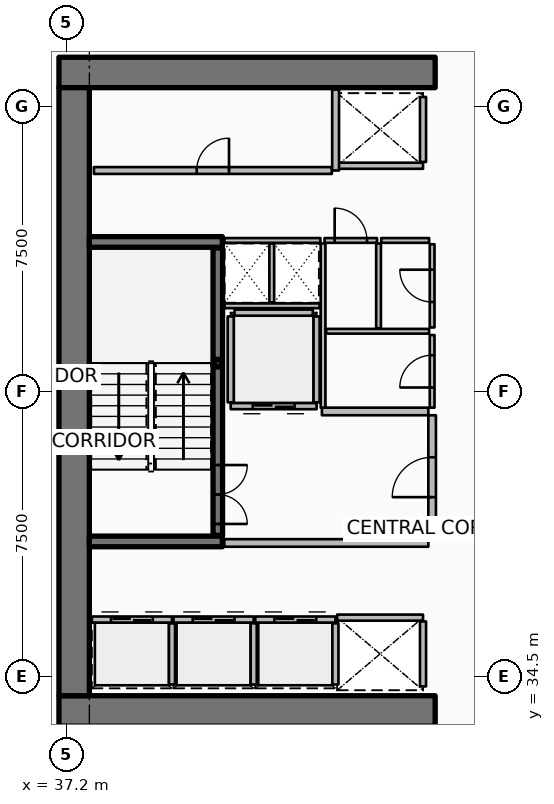
"""IFC4 building model, lengths in metres.
Left out: names, types, materials, properties, quantities, classifications, styles, units other than length and angle.
Written with IfcOpenShell. Run it as: python <this file> out.ifc"""

import sys

from ifc_helpers import new_model, si_unit, direction, frame, frame_2d, origin, origin_2d, place, context, subcontext, project, spatial, rectangle, hollow_rectangle, extrude, element, fill, save


model = new_model("IFC4")
c1 = context("Model", 3, precision=1e-05, world=origin(), true_north=direction((0.0, 1.0)))
c2 = subcontext(c1, "Body", "Model", "MODEL_VIEW")
j1 = project(units=[si_unit("LENGTHUNIT", "METRE"), si_unit("PLANEANGLEUNIT", "RADIAN")], contexts=[c1])
p1 = place(None, origin())
s1 = spatial("IfcSite", under=j1, at=p1, CompositionType="ELEMENT")
p2 = place(p1, origin())
s2 = spatial("IfcBuilding", under=s1, at=p2, CompositionType="ELEMENT")
p3 = place(p2, frame((0.0, 0.0, 97.65)))
s3 = spatial("IfcBuildingStorey", under=s2, at=p3, CompositionType="ELEMENT", Elevation=97.65)
for number, where, z_axis, x_axis in (
    (1, (37.0, 33.6, 0.0), (0.0, 0.0, 1.0), (1.0, 0.0, 0.0)),
    (2, (37.0, 50.4, 0.0), (0.0, 0.0, 1.0), (1.0, 0.0, 0.0)),
):
    element("IfcWall", number, at=place(p3, frame(where, z_axis=z_axis, x_axis=x_axis)), inside=s3, PredefinedType="SHEAR", context=c2, shape_type="SweptSolid", body=[
        extrude(rectangle(XDim=9.9, YDim=0.8, at=frame_2d((4.95, 0.0))), origin(), (0.0, 0.0, 1.0), 3.75),
    ])
p4 = place(p3, frame((37.4, 34.0, 0.0), z_axis=(0.0, 0.0, 1.0), x_axis=(0.0, 1.0, 0.0)))
e3 = element("IfcWall", 3, at=p4, inside=s3, PredefinedType="SHEAR", context=c2, shape_type="SweptSolid", body=[
    extrude(rectangle(XDim=16.0, YDim=0.8, at=frame_2d((8.0, 0.0))), origin(), (0.0, 0.0, 1.0), 3.75),
])
for number, where, z_axis, x_axis in (
    (4, (37.8, 38.06, 0.0), (0.0, 0.0, 1.0), (1.0, 0.0, 0.0)),
    (5, (37.8, 45.94, 0.0), (0.0, 0.0, 1.0), (1.0, 0.0, 0.0)),
):
    element("IfcWall", number, at=place(p3, frame(where, z_axis=z_axis, x_axis=x_axis)), inside=s3, PredefinedType="SHEAR", context=c2, shape_type="SweptSolid", body=[
        extrude(rectangle(XDim=3.5, YDim=0.28, at=frame_2d((1.75, 0.0))), origin(), (0.0, 0.0, 1.0), 3.75),
    ])
p5 = place(p3, frame((41.18, 42.75, 0.0), z_axis=(0.0, 0.0, 1.0), x_axis=(1.0, 0.0, 0.0)))
e6 = element("IfcColumn", 6, at=p5, inside=s3, PredefinedType="COLUMN", context=c2, shape_type="SweptSolid", body=[
    extrude(hollow_rectangle(XDim=0.2, YDim=0.2, WallThickness=0.01, InnerFilletRadius=0.01, OuterFilletRadius=0.02, at=origin_2d()), origin(), (0.0, 0.0, 1.0), 1.67),
])
p6 = place(p3, frame((41.18, 38.22, 0.0), z_axis=(0.0, 0.0, 1.0), x_axis=(0.0, 1.0, 0.0)))
e7 = element("IfcWall", 7, at=p6, inside=s3, PredefinedType="SOLIDWALL", context=c2, shape_type="SweptSolid", body=[
    extrude(rectangle(XDim=7.56, YDim=0.25, at=frame_2d((3.78, 0.0))), origin(), (0.0, 0.0, 1.0), 3.5),
])
p7 = place(p6, frame((0.3, 0.0, 0.0)))
e8 = element("IfcOpeningElement", 8, at=p7, cuts=e7, PredefinedType="OPENING", context=c2, shape_type="SweptSolid", body=[
    extrude(rectangle(XDim=1.55, YDim=2.15, at=frame_2d((0.775, 1.075))), frame((0.0, 0.135, 0.0), z_axis=(0.0, -1.0, 0.0), x_axis=(1.0, 0.0, 0.0)), (0.0, 0.0, 1.0), 0.27),
])
p8 = place(p3, frame((37.865, 36.005, 0.0), z_axis=(0.0, 0.0, 1.0), x_axis=(1.0, 0.0, 0.0)))
e9 = element("IfcWall", 9, at=p8, inside=s3, PredefinedType="PARTITIONING", context=c2, shape_type="SweptSolid", body=[
    extrude(rectangle(XDim=2.11, YDim=0.16, at=frame_2d((1.055, 0.0))), origin(), (0.0, 0.0, 1.0), 3.5),
])
p9 = place(p8, frame((0.505, 0.0, 0.0)))
e10 = element("IfcOpeningElement", 10, at=p9, cuts=e9, PredefinedType="OPENING", context=c2, shape_type="SweptSolid", body=[
    extrude(rectangle(XDim=1.1, YDim=2.1, at=frame_2d((0.55, 1.05))), frame((0.0, 0.09, 0.0), z_axis=(0.0, -1.0, 0.0), x_axis=(1.0, 0.0, 0.0)), (0.0, 0.0, 1.0), 0.18),
])
p10 = place(p3, frame((39.975, 34.295, 0.0), z_axis=(0.0, 0.0, 1.0), x_axis=(0.0, 1.0, 0.0)))
e11 = element("IfcWall", 11, at=p10, inside=s3, PredefinedType="PARTITIONING", context=c2, shape_type="SweptSolid", body=[
    extrude(rectangle(XDim=1.61, YDim=0.16, at=frame_2d((0.805, 0.0))), origin(), (0.0, 0.0, 1.0), 3.5),
])
p11 = place(p3, frame((40.015, 36.005, 0.0), z_axis=(0.0, 0.0, 1.0), x_axis=(1.0, 0.0, 0.0)))
e12 = element("IfcWall", 12, at=p11, inside=s3, PredefinedType="PARTITIONING", context=c2, shape_type="SweptSolid", body=[
    extrude(rectangle(XDim=2.11, YDim=0.16, at=frame_2d((1.055, 0.0))), origin(), (0.0, 0.0, 1.0), 3.5),
])
p12 = place(p11, frame((0.505, 0.0, 0.0)))
e13 = element("IfcOpeningElement", 13, at=p12, cuts=e12, PredefinedType="OPENING", context=c2, shape_type="SweptSolid", body=[
    extrude(rectangle(XDim=1.1, YDim=2.1, at=frame_2d((0.55, 1.05))), frame((0.0, 0.09, 0.0), z_axis=(0.0, -1.0, 0.0), x_axis=(1.0, 0.0, 0.0)), (0.0, 0.0, 1.0), 0.18),
])
p13 = place(p3, frame((42.125, 34.295, 0.0), z_axis=(0.0, 0.0, 1.0), x_axis=(0.0, 1.0, 0.0)))
e14 = element("IfcWall", 14, at=p13, inside=s3, PredefinedType="PARTITIONING", context=c2, shape_type="SweptSolid", body=[
    extrude(rectangle(XDim=1.61, YDim=0.16, at=frame_2d((0.805, 0.0))), origin(), (0.0, 0.0, 1.0), 3.5),
])
p14 = place(p3, frame((42.165, 36.005, 0.0), z_axis=(0.0, 0.0, 1.0), x_axis=(1.0, 0.0, 0.0)))
e15 = element("IfcWall", 15, at=p14, inside=s3, PredefinedType="PARTITIONING", context=c2, shape_type="SweptSolid", body=[
    extrude(rectangle(XDim=2.11, YDim=0.16, at=frame_2d((1.055, 0.0))), origin(), (0.0, 0.0, 1.0), 3.5),
])
p15 = place(p14, frame((0.505, 0.0, 0.0)))
e16 = element("IfcOpeningElement", 16, at=p15, cuts=e15, PredefinedType="OPENING", context=c2, shape_type="SweptSolid", body=[
    extrude(rectangle(XDim=1.1, YDim=2.1, at=frame_2d((0.55, 1.05))), frame((0.0, 0.09, 0.0), z_axis=(0.0, -1.0, 0.0), x_axis=(1.0, 0.0, 0.0)), (0.0, 0.0, 1.0), 0.18),
])
p16 = place(p3, frame((44.275, 34.295, 0.0), z_axis=(0.0, 0.0, 1.0), x_axis=(0.0, 1.0, 0.0)))
e17 = element("IfcWall", 17, at=p16, inside=s3, PredefinedType="PARTITIONING", context=c2, shape_type="SweptSolid", body=[
    extrude(rectangle(XDim=1.61, YDim=0.16, at=frame_2d((0.805, 0.0))), origin(), (0.0, 0.0, 1.0), 3.5),
])
p17 = place(p3, frame((46.58, 47.945, 0.0), z_axis=(0.0, 0.0, 1.0), x_axis=(-1.0, 0.0, 0.0)))
e18 = element("IfcWall", 18, at=p17, inside=s3, PredefinedType="PARTITIONING", context=c2, shape_type="SweptSolid", body=[
    extrude(rectangle(XDim=2.26, YDim=0.16, at=frame_2d((1.13, 0.0))), origin(), (0.0, 0.0, 1.0), 3.5),
])
p18 = place(p3, frame((46.58, 48.045, 0.0), z_axis=(0.0, 0.0, 1.0), x_axis=(0.0, 1.0, 0.0)))
e19 = element("IfcWall", 19, at=p18, inside=s3, PredefinedType="PARTITIONING", context=c2, shape_type="SweptSolid", body=[
    extrude(rectangle(XDim=1.71, YDim=0.16, at=frame_2d((0.855, 0.0))), origin(), (0.0, 0.0, 1.0), 3.5),
])
p19 = place(p3, frame((44.32, 36.055, 0.0), z_axis=(0.0, 0.0, 1.0), x_axis=(1.0, 0.0, 0.0)))
e20 = element("IfcWall", 20, at=p19, inside=s3, PredefinedType="PARTITIONING", context=c2, shape_type="SweptSolid", body=[
    extrude(rectangle(XDim=2.26, YDim=0.16, at=frame_2d((1.13, 0.0))), origin(), (0.0, 0.0, 1.0), 3.5),
])
p20 = place(p3, frame((46.58, 34.245, 0.0), z_axis=(0.0, 0.0, 1.0), x_axis=(0.0, 1.0, 0.0)))
e21 = element("IfcWall", 21, at=p20, inside=s3, PredefinedType="PARTITIONING", context=c2, shape_type="SweptSolid", body=[
    extrude(rectangle(XDim=1.71, YDim=0.16, at=frame_2d((0.855, 0.0))), origin(), (0.0, 0.0, 1.0), 3.5),
])
p21 = place(p3, frame((43.78, 41.62, 0.0), z_axis=(0.0, 0.0, 1.0), x_axis=(-1.0, 0.0, 0.0)))
e22 = element("IfcWall", 22, at=p21, inside=s3, PredefinedType="PARTITIONING", context=c2, shape_type="SweptSolid", body=[
    extrude(rectangle(XDim=2.26, YDim=0.16, at=frame_2d((1.13, 0.0))), origin(), (0.0, 0.0, 1.0), 3.5),
])
p22 = place(p21, frame((0.58, 0.0, 0.0)))
e23 = element("IfcOpeningElement", 23, at=p22, cuts=e22, PredefinedType="OPENING", context=c2, shape_type="SweptSolid", body=[
    extrude(rectangle(XDim=1.1, YDim=2.1, at=frame_2d((0.55, 1.05))), frame((0.0, 0.09, 0.0), z_axis=(0.0, -1.0, 0.0), x_axis=(1.0, 0.0, 0.0)), (0.0, 0.0, 1.0), 0.18),
])
for number, where, z_axis, x_axis in (
    (24, (43.78, 41.72, 0.0), (0.0, 0.0, 1.0), (0.0, 1.0, 0.0)),
    (25, (41.52, 41.72, 0.0), (0.0, 0.0, 1.0), (0.0, 1.0, 0.0)),
):
    element("IfcWall", number, at=place(p3, frame(where, z_axis=z_axis, x_axis=x_axis)), inside=s3, PredefinedType="PARTITIONING", context=c2, shape_type="SweptSolid", body=[
        extrude(rectangle(XDim=2.26, YDim=0.16, at=frame_2d((1.13, 0.0))), origin(), (0.0, 0.0, 1.0), 3.5),
    ])
p23 = place(p3, frame((41.62, 44.08, 0.0), z_axis=(0.0, 0.0, 1.0), x_axis=(1.0, 0.0, 0.0)))
e26 = element("IfcWall", 26, at=p23, inside=s3, PredefinedType="PARTITIONING", context=c2, shape_type="SweptSolid", body=[
    extrude(rectangle(XDim=2.06, YDim=0.16, at=frame_2d((1.03, 0.0))), origin(), (0.0, 0.0, 1.0), 3.5),
])
p24 = place(p3, frame((37.92, 47.82, 0.0), z_axis=(0.0, 0.0, 1.0), x_axis=(1.0, 0.0, 0.0)))
e27 = element("IfcWall", 27, at=p24, inside=s3, PredefinedType="PARTITIONING", context=c2, shape_type="SweptSolid", body=[
    extrude(rectangle(XDim=6.26, YDim=0.18, at=frame_2d((3.13, 0.0))), origin(), (0.0, 0.0, 1.0), 3.5),
])
p25 = place(p24, frame((2.705, 0.0, 0.0)))
e28 = element("IfcOpeningElement", 28, at=p25, cuts=e27, PredefinedType="OPENING", context=c2, shape_type="SweptSolid", body=[
    extrude(rectangle(XDim=0.85, YDim=2.06, at=frame_2d((0.425, 1.03))), frame((0.0, 0.1, 0.0), z_axis=(0.0, -1.0, 0.0), x_axis=(1.0, 0.0, 0.0)), (0.0, 0.0, 1.0), 0.2),
])
p26 = place(p3, frame((44.28, 47.82, 0.0), z_axis=(0.0, 0.0, 1.0), x_axis=(0.0, 1.0, 0.0)))
e29 = element("IfcWall", 29, at=p26, inside=s3, PredefinedType="PARTITIONING", context=c2, shape_type="SweptSolid", body=[
    extrude(rectangle(XDim=2.13, YDim=0.18, at=frame_2d((1.065, 0.0))), origin(), (0.0, 0.0, 1.0), 3.5),
])
p27 = place(p3, frame((41.35, 38.02, 0.0), z_axis=(0.0, 0.0, 1.0), x_axis=(1.0, 0.0, 0.0)))
e30 = element("IfcWall", 30, at=p27, inside=s3, PredefinedType="PARTITIONING", context=c2, shape_type="SweptSolid", body=[
    extrude(rectangle(XDim=5.37, YDim=0.2, at=frame_2d((2.685, 0.0))), origin(), (0.0, 0.0, 1.0), 3.5),
])
p28 = place(p3, frame((43.92, 41.48, 0.0), z_axis=(0.0, 0.0, 1.0), x_axis=(1.0, 0.0, 0.0)))
e31 = element("IfcWall", 31, at=p28, inside=s3, PredefinedType="PARTITIONING", context=c2, shape_type="SweptSolid", body=[
    extrude(rectangle(XDim=2.8, YDim=0.2, at=frame_2d((1.4, 0.0))), origin(), (0.0, 0.0, 1.0), 3.5),
])
p29 = place(p3, frame((46.82, 38.12, 0.0), z_axis=(0.0, 0.0, 1.0), x_axis=(0.0, 1.0, 0.0)))
e32 = element("IfcWall", 32, at=p29, inside=s3, PredefinedType="PARTITIONING", context=c2, shape_type="SweptSolid", body=[
    extrude(rectangle(XDim=3.26, YDim=0.2, at=frame_2d((1.63, 0.0))), origin(), (0.0, 0.0, 1.0), 3.5),
])
p30 = place(p29, frame((1.105, 0.0, 0.0)))
e33 = element("IfcOpeningElement", 33, at=p30, cuts=e32, PredefinedType="OPENING", context=c2, shape_type="SweptSolid", body=[
    extrude(rectangle(XDim=1.05, YDim=2.1, at=frame_2d((0.525, 1.05))), frame((0.0, 0.11, 0.0), z_axis=(0.0, -1.0, 0.0), x_axis=(1.0, 0.0, 0.0)), (0.0, 0.0, 1.0), 0.22),
])
p31 = place(p3, frame((41.36, 44.26, 0.0), z_axis=(0.0, 0.0, 1.0), x_axis=(1.0, 0.0, 0.0)))
e34 = element("IfcWall", 34, at=p31, inside=s3, PredefinedType="PARTITIONING", context=c2, shape_type="SweptSolid", body=[
    extrude(rectangle(XDim=2.5, YDim=0.125, at=frame_2d((1.25, 0.0))), origin(), (0.0, 0.0, 1.0), 2.94),
])
p32 = place(p3, frame((42.6, 44.35, 0.0), z_axis=(0.0, 0.0, 1.0), x_axis=(0.0, 1.0, 0.0)))
e35 = element("IfcWall", 35, at=p32, inside=s3, PredefinedType="PARTITIONING", context=c2, shape_type="SweptSolid", body=[
    extrude(rectangle(XDim=1.55, YDim=0.125, at=frame_2d((0.775, 0.0))), origin(), (0.0, 0.0, 1.0), 2.94),
])
p33 = place(p3, frame((43.95, 41.58, 0.0), z_axis=(0.0, 0.0, 1.0), x_axis=(0.0, 1.0, 0.0)))
e36 = element("IfcWall", 36, at=p33, inside=s3, PredefinedType="PARTITIONING", context=c2, shape_type="SweptSolid", body=[
    extrude(rectangle(XDim=4.32, YDim=0.125, at=frame_2d((2.16, 0.0))), origin(), (0.0, 0.0, 1.0), 2.94),
])
p34 = place(p3, frame((44.03, 43.59, 0.0), z_axis=(0.0, 0.0, 1.0), x_axis=(1.0, 0.0, 0.0)))
e37 = element("IfcWall", 37, at=p34, inside=s3, PredefinedType="PARTITIONING", context=c2, shape_type="SweptSolid", body=[
    extrude(rectangle(XDim=2.71, YDim=0.125, at=frame_2d((1.355, 0.0))), origin(), (0.0, 0.0, 1.0), 2.94),
])
p35 = place(p3, frame((45.41, 43.67, 0.0), z_axis=(0.0, 0.0, 1.0), x_axis=(0.0, 1.0, 0.0)))
e38 = element("IfcWall", 38, at=p35, inside=s3, PredefinedType="PARTITIONING", context=c2, shape_type="SweptSolid", body=[
    extrude(rectangle(XDim=2.23, YDim=0.125, at=frame_2d((1.115, 0.0))), origin(), (0.0, 0.0, 1.0), 2.94),
])
p36 = place(p3, frame((46.82, 41.58, 0.0), z_axis=(0.0, 0.0, 1.0), x_axis=(0.0, 1.0, 0.0)))
e39 = element("IfcWall", 39, at=p36, inside=s3, PredefinedType="PARTITIONING", context=c2, shape_type="SweptSolid", body=[
    extrude(rectangle(XDim=1.91, YDim=0.125, at=frame_2d((0.955, 0.0))), origin(), (0.0, 0.0, 1.0), 2.94),
])
p37 = place(p36, frame((0.53, 0.0, 0.0)))
e40 = element("IfcOpeningElement", 40, at=p37, cuts=e39, PredefinedType="OPENING", context=c2, shape_type="SweptSolid", body=[
    extrude(rectangle(XDim=0.85, YDim=2.06, at=frame_2d((0.425, 1.03))), frame((0.0, 0.073, 0.0), z_axis=(0.0, -1.0, 0.0), x_axis=(1.0, 0.0, 0.0)), (0.0, 0.0, 1.0), 0.145),
])
p38 = place(p3, frame((46.82, 43.69, 0.0), z_axis=(0.0, 0.0, 1.0), x_axis=(0.0, 1.0, 0.0)))
e41 = element("IfcWall", 41, at=p38, inside=s3, PredefinedType="PARTITIONING", context=c2, shape_type="SweptSolid", body=[
    extrude(rectangle(XDim=2.19, YDim=0.125, at=frame_2d((1.095, 0.0))), origin(), (0.0, 0.0, 1.0), 2.94),
])
p39 = place(p38, frame((0.67, 0.0, 0.0)))
e42 = element("IfcOpeningElement", 42, at=p39, cuts=e41, PredefinedType="OPENING", context=c2, shape_type="SweptSolid", body=[
    extrude(rectangle(XDim=0.85, YDim=2.06, at=frame_2d((0.425, 1.03))), frame((0.0, 0.073, 0.0), z_axis=(0.0, -1.0, 0.0), x_axis=(1.0, 0.0, 0.0)), (0.0, 0.0, 1.0), 0.145),
])
p40 = place(p3, frame((41.35, 45.98, 0.0), z_axis=(0.0, 0.0, 1.0), x_axis=(1.0, 0.0, 0.0)))
e43 = element("IfcWall", 43, at=p40, inside=s3, PredefinedType="PARTITIONING", context=c2, shape_type="SweptSolid", body=[
    extrude(rectangle(XDim=2.53, YDim=0.125, at=frame_2d((1.265, 0.0))), origin(), (0.0, 0.0, 1.0), 2.94),
])
p41 = place(p3, frame((43.99, 45.98, 0.0), z_axis=(0.0, 0.0, 1.0), x_axis=(1.0, 0.0, 0.0)))
e44 = element("IfcWall", 44, at=p41, inside=s3, PredefinedType="PARTITIONING", context=c2, shape_type="SweptSolid", body=[
    extrude(rectangle(XDim=1.38, YDim=0.125, at=frame_2d((0.69, 0.0))), origin(), (0.0, 0.0, 1.0), 2.94),
])
p42 = place(p41, frame((0.265, 0.0, 0.0)))
e45 = element("IfcOpeningElement", 45, at=p42, cuts=e44, PredefinedType="OPENING", context=c2, shape_type="SweptSolid", body=[
    extrude(rectangle(XDim=0.85, YDim=2.06, at=frame_2d((0.425, 1.03))), frame((0.0, 0.073, 0.0), z_axis=(0.0, -1.0, 0.0), x_axis=(1.0, 0.0, 0.0)), (0.0, 0.0, 1.0), 0.145),
])
p43 = place(p3, frame((45.48, 45.98, 0.0), z_axis=(0.0, 0.0, 1.0), x_axis=(1.0, 0.0, 0.0)))
e46 = element("IfcWall", 46, at=p43, inside=s3, PredefinedType="PARTITIONING", context=c2, shape_type="SweptSolid", body=[
    extrude(rectangle(XDim=1.26, YDim=0.125, at=frame_2d((0.63, 0.0))), origin(), (0.0, 0.0, 1.0), 2.94),
])
p44 = place(p7, origin())
e47 = element("IfcDoor", 47, at=p44, inside=s3, OperationType="DOUBLE_DOOR_SINGLE_SWING", PredefinedType="DOOR", context=c2, shape_type="SweptSolid", body=[
    extrude(rectangle(XDim=1.55, YDim=2.15, at=frame_2d((0.775, 1.075))), frame((0.0, 0.025, 0.0), z_axis=(0.0, -1.0, 0.0), x_axis=(1.0, 0.0, 0.0)), (0.0, 0.0, 1.0), 0.05),
])
fill(e8, e47)
p45 = place(p9, origin())
e48 = element("IfcDoor", 48, at=p45, inside=s3, OperationType="DOUBLE_DOOR_SLIDING", PredefinedType="DOOR", context=c2, shape_type="SweptSolid", body=[
    extrude(rectangle(XDim=1.1, YDim=2.1, at=frame_2d((0.55, 1.05))), frame((0.0, 0.025, 0.0), z_axis=(0.0, -1.0, 0.0), x_axis=(1.0, 0.0, 0.0)), (0.0, 0.0, 1.0), 0.05),
])
fill(e10, e48)
p46 = place(p12, origin())
e49 = element("IfcDoor", 49, at=p46, inside=s3, OperationType="DOUBLE_DOOR_SLIDING", PredefinedType="DOOR", context=c2, shape_type="SweptSolid", body=[
    extrude(rectangle(XDim=1.1, YDim=2.1, at=frame_2d((0.55, 1.05))), frame((0.0, 0.025, 0.0), z_axis=(0.0, -1.0, 0.0), x_axis=(1.0, 0.0, 0.0)), (0.0, 0.0, 1.0), 0.05),
])
fill(e13, e49)
p47 = place(p15, origin())
e50 = element("IfcDoor", 50, at=p47, inside=s3, OperationType="DOUBLE_DOOR_SLIDING", PredefinedType="DOOR", context=c2, shape_type="SweptSolid", body=[
    extrude(rectangle(XDim=1.1, YDim=2.1, at=frame_2d((0.55, 1.05))), frame((0.0, 0.025, 0.0), z_axis=(0.0, -1.0, 0.0), x_axis=(1.0, 0.0, 0.0)), (0.0, 0.0, 1.0), 0.05),
])
fill(e16, e50)
p48 = place(p22, origin())
e51 = element("IfcDoor", 51, at=p48, inside=s3, OperationType="DOUBLE_DOOR_SLIDING", PredefinedType="DOOR", context=c2, shape_type="SweptSolid", body=[
    extrude(rectangle(XDim=1.1, YDim=2.1, at=frame_2d((0.55, 1.05))), frame((0.0, 0.025, 0.0), z_axis=(0.0, -1.0, 0.0), x_axis=(1.0, 0.0, 0.0)), (0.0, 0.0, 1.0), 0.05),
])
fill(e23, e51)
p49 = place(p25, origin())
e52 = element("IfcDoor", 52, at=p49, inside=s3, OperationType="SINGLE_SWING_RIGHT", PredefinedType="DOOR", context=c2, shape_type="SweptSolid", body=[
    extrude(rectangle(XDim=0.85, YDim=2.06, at=frame_2d((0.425, 1.03))), frame((0.0, 0.025, 0.0), z_axis=(0.0, -1.0, 0.0), x_axis=(1.0, 0.0, 0.0)), (0.0, 0.0, 1.0), 0.05),
])
fill(e28, e52)
p50 = place(p30, origin())
e53 = element("IfcDoor", 53, at=p50, inside=s3, OperationType="SINGLE_SWING_LEFT", PredefinedType="DOOR", context=c2, shape_type="SweptSolid", body=[
    extrude(rectangle(XDim=1.05, YDim=2.1, at=frame_2d((0.525, 1.05))), frame((0.0, 0.025, 0.0), z_axis=(0.0, -1.0, 0.0), x_axis=(1.0, 0.0, 0.0)), (0.0, 0.0, 1.0), 0.05),
])
fill(e33, e53)
p51 = place(p37, origin())
e54 = element("IfcDoor", 54, at=p51, inside=s3, OperationType="SINGLE_SWING_LEFT", PredefinedType="DOOR", context=c2, shape_type="SweptSolid", body=[
    extrude(rectangle(XDim=0.85, YDim=2.06, at=frame_2d((0.425, 1.03))), frame((0.0, 0.025, 0.0), z_axis=(0.0, -1.0, 0.0), x_axis=(1.0, 0.0, 0.0)), (0.0, 0.0, 1.0), 0.05),
])
fill(e40, e54)
p52 = place(p39, origin())
e55 = element("IfcDoor", 55, at=p52, inside=s3, OperationType="SINGLE_SWING_RIGHT", PredefinedType="DOOR", context=c2, shape_type="SweptSolid", body=[
    extrude(rectangle(XDim=0.85, YDim=2.06, at=frame_2d((0.425, 1.03))), frame((0.0, 0.025, 0.0), z_axis=(0.0, -1.0, 0.0), x_axis=(1.0, 0.0, 0.0)), (0.0, 0.0, 1.0), 0.05),
])
fill(e42, e55)
p53 = place(p42, origin())
e56 = element("IfcDoor", 56, at=p53, inside=s3, OperationType="SINGLE_SWING_LEFT", PredefinedType="DOOR", context=c2, shape_type="SweptSolid", body=[
    extrude(rectangle(XDim=0.85, YDim=2.06, at=frame_2d((0.425, 1.03))), frame((0.0, 0.025, 0.0), z_axis=(0.0, -1.0, 0.0), x_axis=(1.0, 0.0, 0.0)), (0.0, 0.0, 1.0), 0.05),
])
fill(e45, e56)
save(model, sys.argv[1])
